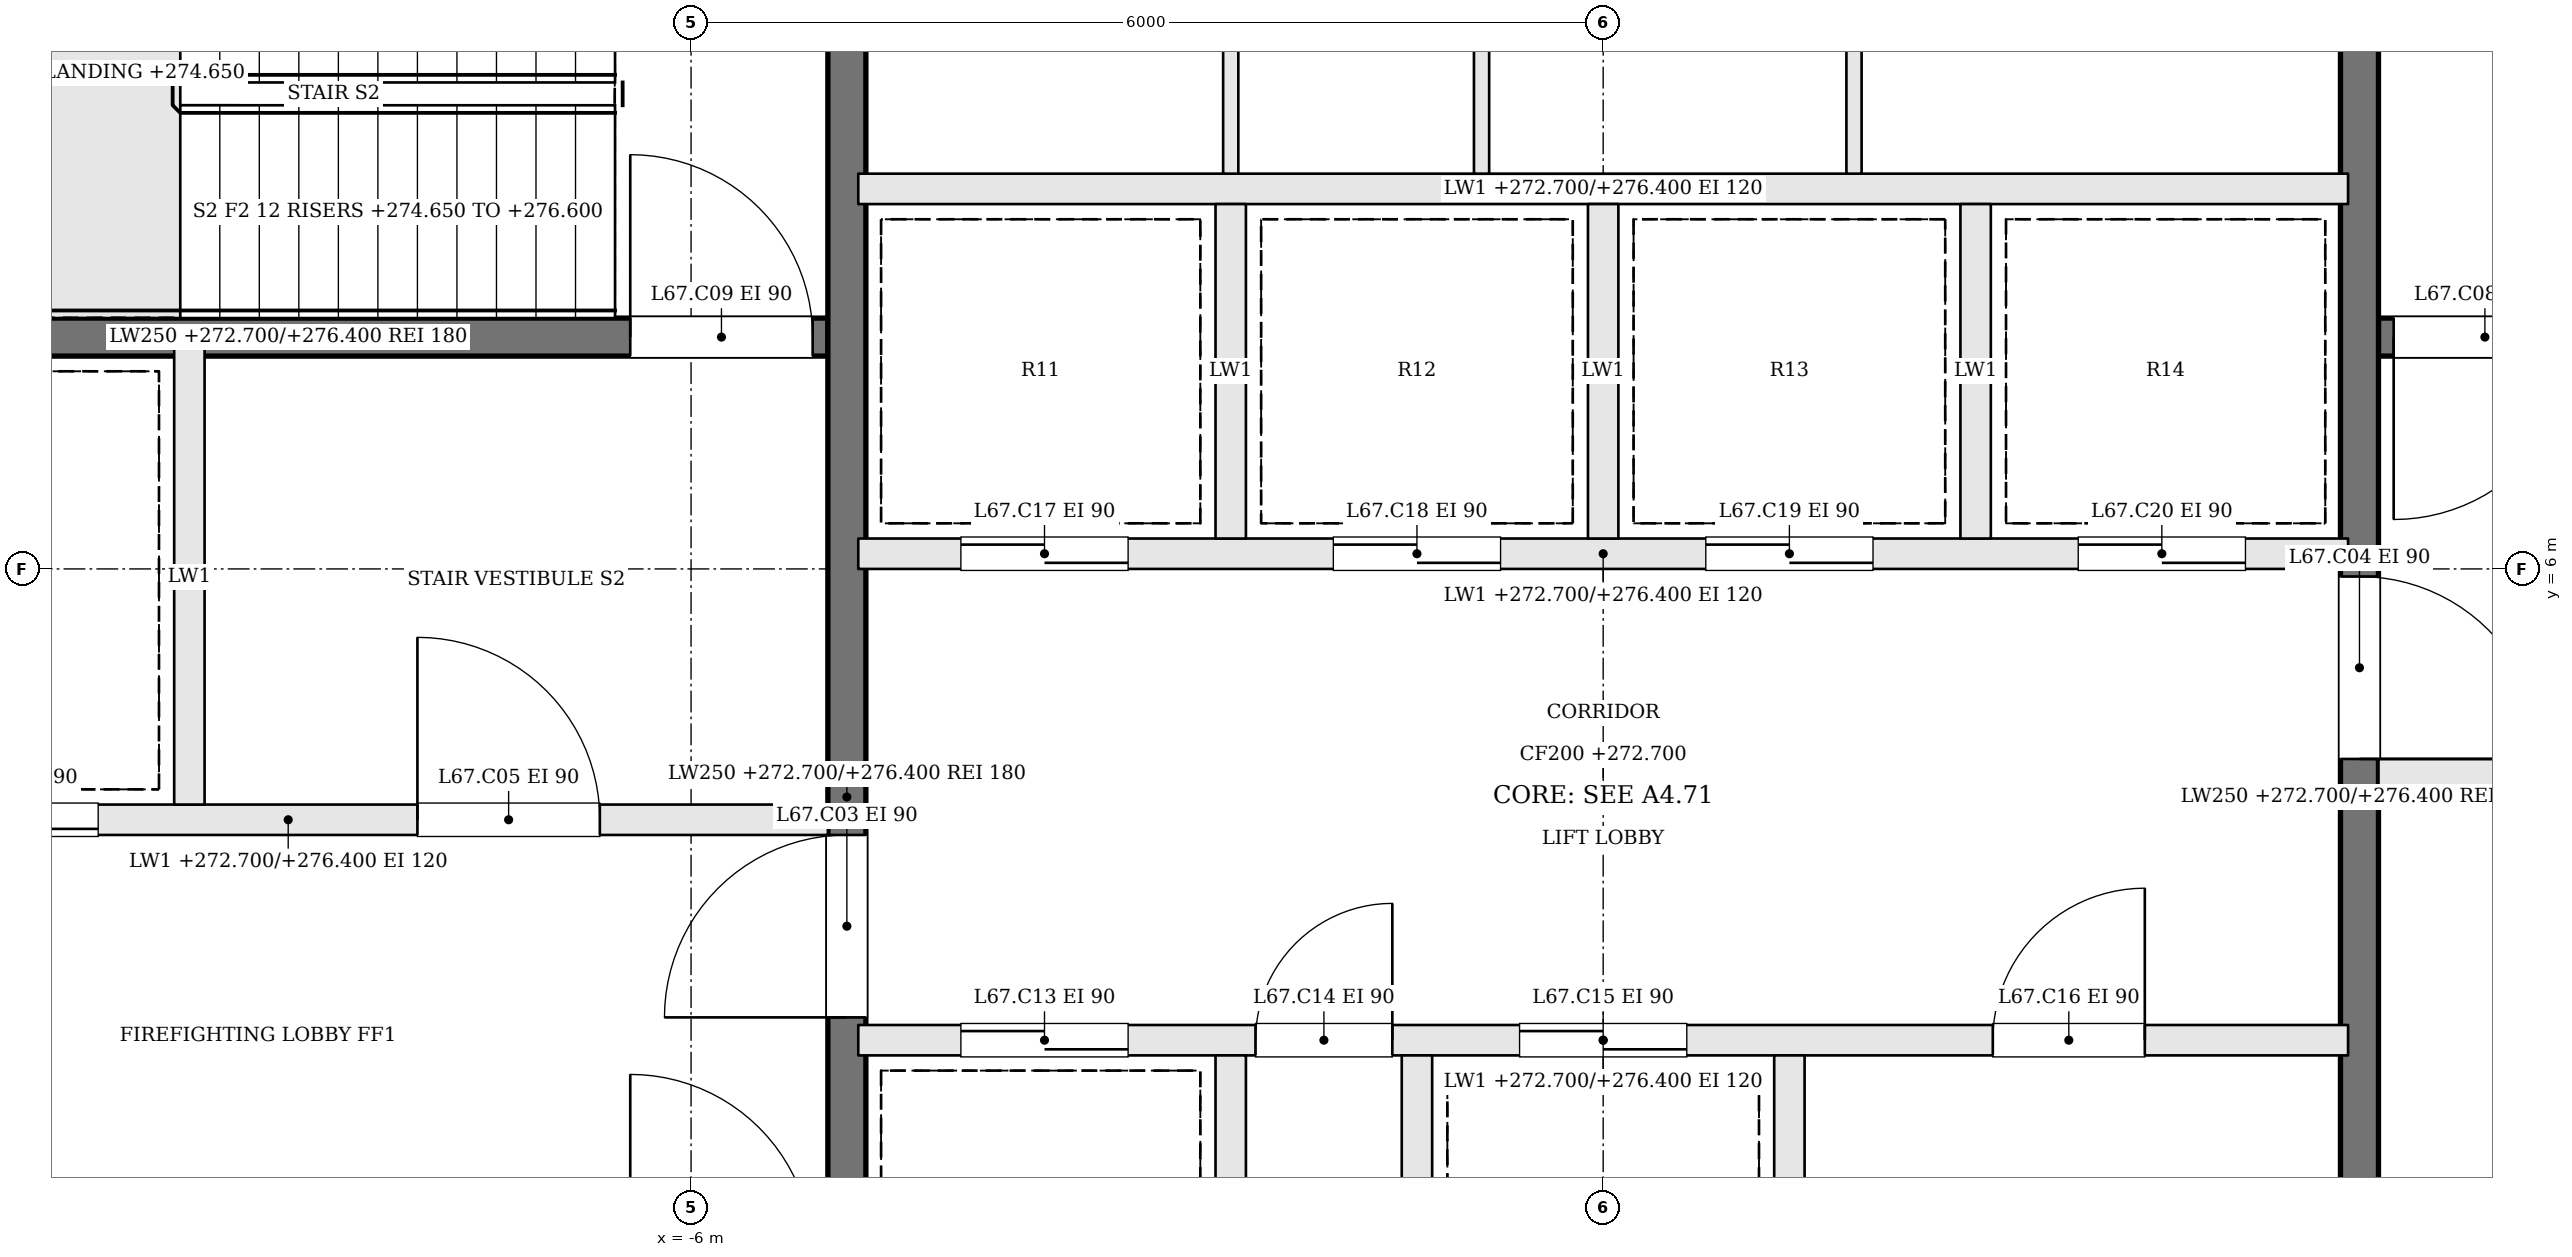
"""IFC4 building model, lengths in metres.
Left out: names, types, materials, properties, quantities, classifications, styles, units other than length and angle.
Written with IfcOpenShell. Run it as: python <this file> out.ifc"""

import sys

from ifc_helpers import new_model, si_unit, direction, frame, frame_2d, origin, place, context, subcontext, project, spatial, rectangle, extrude, element, fill, save


model = new_model("IFC4")
c1 = context("Model", 3, precision=1e-05, world=origin(), true_north=direction((0.0, 1.0)))
c2 = subcontext(c1, "Body", "Model", "MODEL_VIEW")
j1 = project(units=[si_unit("LENGTHUNIT", "METRE"), si_unit("PLANEANGLEUNIT", "RADIAN")], contexts=[c1])
p1 = place(None, origin())
s1 = spatial("IfcSite", under=j1, at=p1, CompositionType="ELEMENT")
p2 = place(p1, origin())
s2 = spatial("IfcBuilding", under=s1, at=p2, CompositionType="ELEMENT")
p3 = place(p2, frame((0.0, 0.0, 272.7)))
s3 = spatial("IfcBuildingStorey", under=s2, at=p3, CompositionType="ELEMENT", Elevation=272.7)
p4 = place(p3, frame((12.2, 7.525, 0.0), z_axis=(0.0, 0.0, 1.0), x_axis=(-1.0, 0.0, 0.0)))
e1 = element("IfcWall", 1, at=p4, inside=s3, PredefinedType="SOLIDWALL", context=c2, shape_type="SweptSolid", body=[
    extrude(rectangle(XDim=7.1, YDim=0.25, at=frame_2d((3.55, 0.0))), origin(), (0.0, 0.0, 1.0), 3.7),
])
p5 = place(p4, frame((5.8, 0.0, 0.0)))
e2 = element("IfcOpeningElement", 2, at=p5, cuts=e1, PredefinedType="OPENING", context=c2, shape_type="SweptSolid", body=[
    extrude(rectangle(XDim=1.2, YDim=2.1, at=frame_2d((0.6, 1.05))), frame((0.0, 0.135, 0.0), z_axis=(0.0, -1.0, 0.0), x_axis=(1.0, 0.0, 0.0)), (0.0, 0.0, 1.0), 0.27),
])
p6 = place(p3, frame((-12.2, 4.35, 0.0), z_axis=(0.0, 0.0, 1.0), x_axis=(1.0, 0.0, 0.0)))
e3 = element("IfcWall", 3, at=p6, inside=s3, PredefinedType="SOLIDWALL", context=c2, shape_type="SweptSolid", body=[
    extrude(rectangle(XDim=7.1, YDim=0.2, at=frame_2d((3.55, 0.0))), origin(), (0.0, 0.0, 1.0), 3.7),
])
p7 = place(p6, frame((4.4, 0.0, 0.0)))
e4 = element("IfcOpeningElement", 4, at=p7, cuts=e3, PredefinedType="OPENING", context=c2, shape_type="SweptSolid", body=[
    extrude(rectangle(XDim=1.2, YDim=2.1, at=frame_2d((0.6, 1.05))), frame((0.0, 0.11, 0.0), z_axis=(0.0, -1.0, 0.0), x_axis=(1.0, 0.0, 0.0)), (0.0, 0.0, 1.0), 0.22),
])
p8 = place(p6, frame((1.1, 0.0, 0.0)))
e5 = element("IfcOpeningElement", 5, at=p8, cuts=e3, PredefinedType="OPENING", context=c2, shape_type="SweptSolid", body=[
    extrude(rectangle(XDim=1.2, YDim=2.1, at=frame_2d((0.6, 1.05))), frame((0.0, 0.11, 0.0), z_axis=(0.0, -1.0, 0.0), x_axis=(1.0, 0.0, 0.0)), (0.0, 0.0, 1.0), 0.22),
])
p9 = place(p3, frame((12.2, 4.65, 0.0), z_axis=(0.0, 0.0, 1.0), x_axis=(-1.0, 0.0, 0.0)))
e6 = element("IfcWall", 6, at=p9, inside=s3, PredefinedType="SOLIDWALL", context=c2, shape_type="SweptSolid", body=[
    extrude(rectangle(XDim=7.1, YDim=0.2, at=frame_2d((3.55, 0.0))), origin(), (0.0, 0.0, 1.0), 3.7),
])
p10 = place(p9, frame((4.4, 0.0, 0.0)))
e7 = element("IfcOpeningElement", 7, at=p10, cuts=e6, PredefinedType="OPENING", context=c2, shape_type="SweptSolid", body=[
    extrude(rectangle(XDim=1.2, YDim=2.1, at=frame_2d((0.6, 1.05))), frame((0.0, 0.11, 0.0), z_axis=(0.0, -1.0, 0.0), x_axis=(1.0, 0.0, 0.0)), (0.0, 0.0, 1.0), 0.22),
])
p11 = place(p9, frame((1.1, 0.0, 0.0)))
e8 = element("IfcOpeningElement", 8, at=p11, cuts=e6, PredefinedType="OPENING", context=c2, shape_type="SweptSolid", body=[
    extrude(rectangle(XDim=1.2, YDim=2.1, at=frame_2d((0.6, 1.05))), frame((0.0, 0.11, 0.0), z_axis=(0.0, -1.0, 0.0), x_axis=(1.0, 0.0, 0.0)), (0.0, 0.0, 1.0), 0.22),
])
p12 = place(p3, frame((-12.2, 7.525, 0.0), z_axis=(0.0, 0.0, 1.0), x_axis=(1.0, 0.0, 0.0)))
e9 = element("IfcWall", 9, at=p12, inside=s3, PredefinedType="SOLIDWALL", context=c2, shape_type="SweptSolid", body=[
    extrude(rectangle(XDim=7.1, YDim=0.25, at=frame_2d((3.55, 0.0))), origin(), (0.0, 0.0, 1.0), 3.7),
])
p13 = place(p12, frame((5.8, 0.0, 0.0)))
e10 = element("IfcOpeningElement", 10, at=p13, cuts=e9, PredefinedType="OPENING", context=c2, shape_type="SweptSolid", body=[
    extrude(rectangle(XDim=1.2, YDim=2.1, at=frame_2d((0.6, 1.05))), frame((0.0, 0.135, 0.0), z_axis=(0.0, -1.0, 0.0), x_axis=(1.0, 0.0, 0.0)), (0.0, 0.0, 1.0), 0.27),
])
p14 = place(p3, frame((-9.3, 4.45, 0.0), z_axis=(0.0, 0.0, 1.0), x_axis=(0.0, 1.0, 0.0)))
e11 = element("IfcWall", 11, at=p14, inside=s3, PredefinedType="SOLIDWALL", context=c2, shape_type="SweptSolid", body=[
    extrude(rectangle(XDim=3.0, YDim=0.2, at=frame_2d((1.5, 0.0))), origin(), (0.0, 0.0, 1.0), 3.7),
])
p15 = place(p3, frame((-4.975, -2.2, 0.0), z_axis=(0.0, 0.0, 1.0), x_axis=(0.0, 1.0, 0.0)))
e12 = element("IfcWall", 12, at=p15, inside=s3, PredefinedType="SOLIDWALL", context=c2, shape_type="SweptSolid", body=[
    extrude(rectangle(XDim=13.4, YDim=0.25, at=frame_2d((6.7, 0.0))), origin(), (0.0, 0.0, 1.0), 3.7),
])
p16 = place(p15, frame((5.25, 0.0, 0.0)))
e13 = element("IfcOpeningElement", 13, at=p16, cuts=e12, PredefinedType="OPENING", context=c2, shape_type="SweptSolid", body=[
    extrude(rectangle(XDim=1.2, YDim=2.1, at=frame_2d((0.6, 1.05))), frame((0.0, 0.135, 0.0), z_axis=(0.0, -1.0, 0.0), x_axis=(1.0, 0.0, 0.0)), (0.0, 0.0, 1.0), 0.27),
])
p17 = place(p3, frame((4.975, 11.2, 0.0), z_axis=(0.0, 0.0, 1.0), x_axis=(0.0, -1.0, 0.0)))
e14 = element("IfcWall", 14, at=p17, inside=s3, PredefinedType="SOLIDWALL", context=c2, shape_type="SweptSolid", body=[
    extrude(rectangle(XDim=13.4, YDim=0.25, at=frame_2d((6.7, 0.0))), origin(), (0.0, 0.0, 1.0), 3.7),
])
p18 = place(p17, frame((5.25, 0.0, 0.0)))
e15 = element("IfcOpeningElement", 15, at=p18, cuts=e14, PredefinedType="OPENING", context=c2, shape_type="SweptSolid", body=[
    extrude(rectangle(XDim=1.2, YDim=2.1, at=frame_2d((0.6, 1.05))), frame((0.0, 0.135, 0.0), z_axis=(0.0, -1.0, 0.0), x_axis=(1.0, 0.0, 0.0)), (0.0, 0.0, 1.0), 0.27),
])
p19 = place(p3, frame((-4.9, 2.9, 0.0), z_axis=(0.0, 0.0, 1.0), x_axis=(1.0, 0.0, 0.0)))
e16 = element("IfcWall", 16, at=p19, inside=s3, PredefinedType="SOLIDWALL", context=c2, shape_type="SweptSolid", body=[
    extrude(rectangle(XDim=9.8, YDim=0.2, at=frame_2d((4.9, 0.0))), origin(), (0.0, 0.0, 1.0), 3.7),
])
p20 = place(p19, frame((0.675, 0.0, 0.0)))
e17 = element("IfcOpeningElement", 17, at=p20, cuts=e16, PredefinedType="OPENING", context=c2, shape_type="SweptSolid", body=[
    extrude(rectangle(XDim=1.1, YDim=2.1, at=frame_2d((0.55, 1.05))), frame((0.0, 0.11, 0.0), z_axis=(0.0, -1.0, 0.0), x_axis=(1.0, 0.0, 0.0)), (0.0, 0.0, 1.0), 0.22),
])
p21 = place(p19, frame((2.613, 0.0, 0.0)))
e18 = element("IfcOpeningElement", 18, at=p21, cuts=e16, PredefinedType="OPENING", context=c2, shape_type="SweptSolid", body=[
    extrude(rectangle(XDim=0.9, YDim=2.1, at=frame_2d((0.45, 1.05))), frame((0.0, 0.11, 0.0), z_axis=(0.0, -1.0, 0.0), x_axis=(1.0, 0.0, 0.0)), (0.0, 0.0, 1.0), 0.22),
])
p22 = place(p19, frame((4.35, 0.0, 0.0)))
e19 = element("IfcOpeningElement", 19, at=p22, cuts=e16, PredefinedType="OPENING", context=c2, shape_type="SweptSolid", body=[
    extrude(rectangle(XDim=1.1, YDim=2.1, at=frame_2d((0.55, 1.05))), frame((0.0, 0.11, 0.0), z_axis=(0.0, -1.0, 0.0), x_axis=(1.0, 0.0, 0.0)), (0.0, 0.0, 1.0), 0.22),
])
p23 = place(p19, frame((7.463, 0.0, 0.0)))
e20 = element("IfcOpeningElement", 20, at=p23, cuts=e16, PredefinedType="OPENING", context=c2, shape_type="SweptSolid", body=[
    extrude(rectangle(XDim=1.0, YDim=2.1, at=frame_2d((0.5, 1.05))), frame((0.0, 0.11, 0.0), z_axis=(0.0, -1.0, 0.0), x_axis=(1.0, 0.0, 0.0)), (0.0, 0.0, 1.0), 0.22),
])
p24 = place(p3, frame((-4.9, 6.1, 0.0), z_axis=(0.0, 0.0, 1.0), x_axis=(1.0, 0.0, 0.0)))
e21 = element("IfcWall", 21, at=p24, inside=s3, PredefinedType="SOLIDWALL", context=c2, shape_type="SweptSolid", body=[
    extrude(rectangle(XDim=9.8, YDim=0.2, at=frame_2d((4.9, 0.0))), origin(), (0.0, 0.0, 1.0), 3.7),
])
p25 = place(p24, frame((0.675, 0.0, 0.0)))
e22 = element("IfcOpeningElement", 22, at=p25, cuts=e21, PredefinedType="OPENING", context=c2, shape_type="SweptSolid", body=[
    extrude(rectangle(XDim=1.1, YDim=2.1, at=frame_2d((0.55, 1.05))), frame((0.0, 0.11, 0.0), z_axis=(0.0, -1.0, 0.0), x_axis=(1.0, 0.0, 0.0)), (0.0, 0.0, 1.0), 0.22),
])
p26 = place(p24, frame((3.125, 0.0, 0.0)))
e23 = element("IfcOpeningElement", 23, at=p26, cuts=e21, PredefinedType="OPENING", context=c2, shape_type="SweptSolid", body=[
    extrude(rectangle(XDim=1.1, YDim=2.1, at=frame_2d((0.55, 1.05))), frame((0.0, 0.11, 0.0), z_axis=(0.0, -1.0, 0.0), x_axis=(1.0, 0.0, 0.0)), (0.0, 0.0, 1.0), 0.22),
])
p27 = place(p24, frame((5.575, 0.0, 0.0)))
e24 = element("IfcOpeningElement", 24, at=p27, cuts=e21, PredefinedType="OPENING", context=c2, shape_type="SweptSolid", body=[
    extrude(rectangle(XDim=1.1, YDim=2.1, at=frame_2d((0.55, 1.05))), frame((0.0, 0.11, 0.0), z_axis=(0.0, -1.0, 0.0), x_axis=(1.0, 0.0, 0.0)), (0.0, 0.0, 1.0), 0.22),
])
p28 = place(p24, frame((8.025, 0.0, 0.0)))
e25 = element("IfcOpeningElement", 25, at=p28, cuts=e21, PredefinedType="OPENING", context=c2, shape_type="SweptSolid", body=[
    extrude(rectangle(XDim=1.1, YDim=2.1, at=frame_2d((0.55, 1.05))), frame((0.0, 0.11, 0.0), z_axis=(0.0, -1.0, 0.0), x_axis=(1.0, 0.0, 0.0)), (0.0, 0.0, 1.0), 0.22),
])
p29 = place(p3, frame((-4.9, 8.5, 0.0), z_axis=(0.0, 0.0, 1.0), x_axis=(1.0, 0.0, 0.0)))
e26 = element("IfcWall", 26, at=p29, inside=s3, PredefinedType="SOLIDWALL", context=c2, shape_type="SweptSolid", body=[
    extrude(rectangle(XDim=9.8, YDim=0.2, at=frame_2d((4.9, 0.0))), origin(), (0.0, 0.0, 1.0), 3.7),
])
for number, where, z_axis, x_axis in (
    (27, (-2.45, 0.6, 0.0), (0.0, 0.0, 1.0), (0.0, 1.0, 0.0)),
    (28, (-1.225, 0.6, 0.0), (0.0, 0.0, 1.0), (0.0, 1.0, 0.0)),
    (29, (1.225, 0.6, 0.0), (0.0, 0.0, 1.0), (0.0, 1.0, 0.0)),
    (30, (-2.45, 6.2, 0.0), (0.0, 0.0, 1.0), (0.0, 1.0, 0.0)),
    (31, (0.0, 6.2, 0.0), (0.0, 0.0, 1.0), (0.0, 1.0, 0.0)),
    (32, (2.45, 6.2, 0.0), (0.0, 0.0, 1.0), (0.0, 1.0, 0.0)),
):
    element("IfcWall", number, at=place(p3, frame(where, z_axis=z_axis, x_axis=x_axis)), inside=s3, PredefinedType="SOLIDWALL", context=c2, shape_type="SweptSolid", body=[
        extrude(rectangle(XDim=2.2, YDim=0.2, at=frame_2d((1.1, 0.0))), origin(), (0.0, 0.0, 1.0), 3.7),
    ])
for number, where, z_axis, x_axis in (
    (33, (-2.45, 8.6, 0.0), (0.0, 0.0, 1.0), (0.0, 1.0, 0.0)),
    (34, (-0.8, 8.6, 0.0), (0.0, 0.0, 1.0), (0.0, 1.0, 0.0)),
    (35, (1.65, 8.6, 0.0), (0.0, 0.0, 1.0), (0.0, 1.0, 0.0)),
):
    element("IfcWall", number, at=place(p3, frame(where, z_axis=z_axis, x_axis=x_axis)), inside=s3, PredefinedType="PARTITIONING", context=c2, shape_type="SweptSolid", body=[
        extrude(rectangle(XDim=2.6, YDim=0.1, at=frame_2d((1.3, 0.0))), origin(), (0.0, 0.0, 1.0), 3.7),
    ])
p30 = place(p16, origin())
e36 = element("IfcDoor", 36, at=p30, inside=s3, OperationType="SINGLE_SWING_LEFT", PredefinedType="DOOR", context=c2, shape_type="SweptSolid", body=[
    extrude(rectangle(XDim=1.2, YDim=2.1, at=frame_2d((0.6, 1.05))), frame((0.0, 0.025, 0.0), z_axis=(0.0, -1.0, 0.0), x_axis=(1.0, 0.0, 0.0)), (0.0, 0.0, 1.0), 0.05),
])
fill(e13, e36)
p31 = place(p18, origin())
e37 = element("IfcDoor", 37, at=p31, inside=s3, OperationType="SINGLE_SWING_RIGHT", PredefinedType="DOOR", context=c2, shape_type="SweptSolid", body=[
    extrude(rectangle(XDim=1.2, YDim=2.1, at=frame_2d((0.6, 1.05))), frame((0.0, 0.025, 0.0), z_axis=(0.0, -1.0, 0.0), x_axis=(1.0, 0.0, 0.0)), (0.0, 0.0, 1.0), 0.05),
])
fill(e15, e37)
p32 = place(p7, origin())
e38 = element("IfcDoor", 38, at=p32, inside=s3, OperationType="SINGLE_SWING_LEFT", PredefinedType="DOOR", context=c2, shape_type="SweptSolid", body=[
    extrude(rectangle(XDim=1.2, YDim=2.1, at=frame_2d((0.6, 1.05))), frame((0.0, 0.025, 0.0), z_axis=(0.0, -1.0, 0.0), x_axis=(1.0, 0.0, 0.0)), (0.0, 0.0, 1.0), 0.05),
])
fill(e4, e38)
p33 = place(p5, origin())
e39 = element("IfcDoor", 39, at=p33, inside=s3, OperationType="SINGLE_SWING_RIGHT", PredefinedType="DOOR", context=c2, shape_type="SweptSolid", body=[
    extrude(rectangle(XDim=1.2, YDim=2.1, at=frame_2d((0.6, 1.05))), frame((0.0, 0.025, 0.0), z_axis=(0.0, -1.0, 0.0), x_axis=(1.0, 0.0, 0.0)), (0.0, 0.0, 1.0), 0.05),
])
fill(e2, e39)
p34 = place(p13, origin())
e40 = element("IfcDoor", 40, at=p34, inside=s3, OperationType="SINGLE_SWING_LEFT", PredefinedType="DOOR", context=c2, shape_type="SweptSolid", body=[
    extrude(rectangle(XDim=1.2, YDim=2.1, at=frame_2d((0.6, 1.05))), frame((0.0, 0.025, 0.0), z_axis=(0.0, -1.0, 0.0), x_axis=(1.0, 0.0, 0.0)), (0.0, 0.0, 1.0), 0.05),
])
fill(e10, e40)
p35 = place(p8, origin())
e41 = element("IfcDoor", 41, at=p35, inside=s3, OperationType="SLIDING_TO_RIGHT", PredefinedType="DOOR", context=c2, shape_type="SweptSolid", body=[
    extrude(rectangle(XDim=1.2, YDim=2.1, at=frame_2d((0.6, 1.05))), frame((0.0, 0.025, 0.0), z_axis=(0.0, -1.0, 0.0), x_axis=(1.0, 0.0, 0.0)), (0.0, 0.0, 1.0), 0.05),
])
fill(e5, e41)
p36 = place(p20, origin())
e42 = element("IfcDoor", 42, at=p36, inside=s3, OperationType="SLIDING_TO_RIGHT", PredefinedType="DOOR", context=c2, shape_type="SweptSolid", body=[
    extrude(rectangle(XDim=1.1, YDim=2.1, at=frame_2d((0.55, 1.05))), frame((0.0, 0.025, 0.0), z_axis=(0.0, -1.0, 0.0), x_axis=(1.0, 0.0, 0.0)), (0.0, 0.0, 1.0), 0.05),
])
fill(e17, e42)
p37 = place(p21, origin())
e43 = element("IfcDoor", 43, at=p37, inside=s3, OperationType="SINGLE_SWING_RIGHT", PredefinedType="DOOR", context=c2, shape_type="SweptSolid", body=[
    extrude(rectangle(XDim=0.9, YDim=2.1, at=frame_2d((0.45, 1.05))), frame((0.0, 0.025, 0.0), z_axis=(0.0, -1.0, 0.0), x_axis=(1.0, 0.0, 0.0)), (0.0, 0.0, 1.0), 0.05),
])
fill(e18, e43)
p38 = place(p22, origin())
e44 = element("IfcDoor", 44, at=p38, inside=s3, OperationType="SLIDING_TO_LEFT", PredefinedType="DOOR", context=c2, shape_type="SweptSolid", body=[
    extrude(rectangle(XDim=1.1, YDim=2.1, at=frame_2d((0.55, 1.05))), frame((0.0, 0.025, 0.0), z_axis=(0.0, -1.0, 0.0), x_axis=(1.0, 0.0, 0.0)), (0.0, 0.0, 1.0), 0.05),
])
fill(e19, e44)
p39 = place(p23, origin())
e45 = element("IfcDoor", 45, at=p39, inside=s3, OperationType="SINGLE_SWING_RIGHT", PredefinedType="DOOR", context=c2, shape_type="SweptSolid", body=[
    extrude(rectangle(XDim=1.0, YDim=2.1, at=frame_2d((0.5, 1.05))), frame((0.0, 0.025, 0.0), z_axis=(0.0, -1.0, 0.0), x_axis=(1.0, 0.0, 0.0)), (0.0, 0.0, 1.0), 0.05),
])
fill(e20, e45)
p40 = place(p25, origin())
e46 = element("IfcDoor", 46, at=p40, inside=s3, OperationType="SLIDING_TO_RIGHT", PredefinedType="DOOR", context=c2, shape_type="SweptSolid", body=[
    extrude(rectangle(XDim=1.1, YDim=2.1, at=frame_2d((0.55, 1.05))), frame((0.0, 0.025, 0.0), z_axis=(0.0, -1.0, 0.0), x_axis=(1.0, 0.0, 0.0)), (0.0, 0.0, 1.0), 0.05),
])
fill(e22, e46)
p41 = place(p26, origin())
e47 = element("IfcDoor", 47, at=p41, inside=s3, OperationType="SLIDING_TO_LEFT", PredefinedType="DOOR", context=c2, shape_type="SweptSolid", body=[
    extrude(rectangle(XDim=1.1, YDim=2.1, at=frame_2d((0.55, 1.05))), frame((0.0, 0.025, 0.0), z_axis=(0.0, -1.0, 0.0), x_axis=(1.0, 0.0, 0.0)), (0.0, 0.0, 1.0), 0.05),
])
fill(e23, e47)
p42 = place(p27, origin())
e48 = element("IfcDoor", 48, at=p42, inside=s3, OperationType="SLIDING_TO_RIGHT", PredefinedType="DOOR", context=c2, shape_type="SweptSolid", body=[
    extrude(rectangle(XDim=1.1, YDim=2.1, at=frame_2d((0.55, 1.05))), frame((0.0, 0.025, 0.0), z_axis=(0.0, -1.0, 0.0), x_axis=(1.0, 0.0, 0.0)), (0.0, 0.0, 1.0), 0.05),
])
fill(e24, e48)
p43 = place(p28, origin())
e49 = element("IfcDoor", 49, at=p43, inside=s3, OperationType="SLIDING_TO_LEFT", PredefinedType="DOOR", context=c2, shape_type="SweptSolid", body=[
    extrude(rectangle(XDim=1.1, YDim=2.1, at=frame_2d((0.55, 1.05))), frame((0.0, 0.025, 0.0), z_axis=(0.0, -1.0, 0.0), x_axis=(1.0, 0.0, 0.0)), (0.0, 0.0, 1.0), 0.05),
])
fill(e25, e49)
save(model, sys.argv[1])
